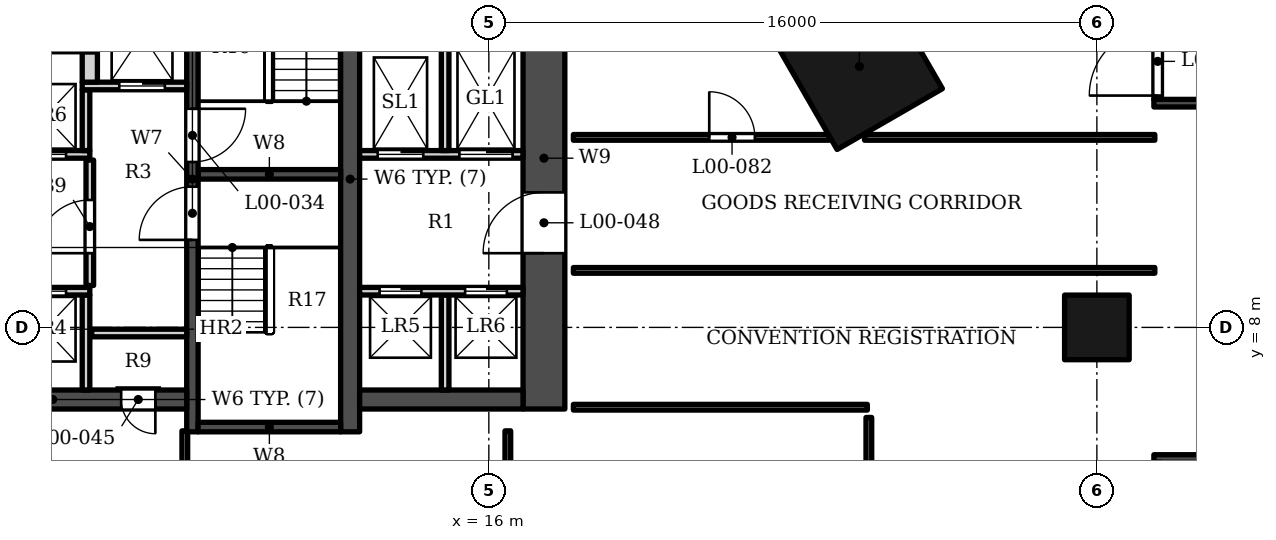
"""IFC4 building model, lengths in metres.
Left out: names, types, materials, properties, quantities, classifications, styles, units other than length and angle.
Written with IfcOpenShell. Run it as: python <this file> out.ifc"""

import sys

from ifc_helpers import new_model, si_unit, direction, frame, frame_2d, origin, origin_2d, place, context, subcontext, project, spatial, rectangle, extrude, element, fill, save


model = new_model("IFC4")
c1 = context("Model", 3, precision=1e-05, world=origin(), true_north=direction((0.0, 1.0)))
c2 = subcontext(c1, "Body", "Model", "MODEL_VIEW")
j1 = project(units=[si_unit("LENGTHUNIT", "METRE"), si_unit("PLANEANGLEUNIT", "RADIAN")], contexts=[c1])
p1 = place(None, origin())
s1 = spatial("IfcSite", under=j1, at=p1, CompositionType="ELEMENT")
p2 = place(p1, origin())
s2 = spatial("IfcBuilding", under=s1, at=p2, CompositionType="ELEMENT")
p3 = place(p2, origin())
s3 = spatial("IfcBuildingStorey", under=s2, at=p3, CompositionType="ELEMENT", Elevation=0.0)
p4 = place(p3, frame((32.0, 8.0, 0.0), z_axis=(0.0, 0.0, 1.0), x_axis=(1.0, 0.0, 0.0)))
e1 = element("IfcColumn", 1, at=p4, inside=s3, PredefinedType="COLUMN", context=c2, shape_type="SweptSolid", body=[
    extrude(rectangle(XDim=1.7, YDim=1.7, at=origin_2d()), origin(), (0.0, 0.0, 1.0), 9.0),
])
p5 = place(p3, frame((25.75, 14.867, 0.0), z_axis=(0.0, 0.0, 1.0), x_axis=(-0.866025386331, -0.50000003023, 0.0)))
e2 = element("IfcColumn", 2, at=p5, inside=s3, PredefinedType="COLUMN", context=c2, shape_type="SweptSolid", body=[
    extrude(rectangle(XDim=3.2, YDim=3.2, at=origin_2d()), origin(), (0.0, 0.0, 1.0), 9.0),
])
p6 = place(p3, frame((12.35, 5.253, 0.0), z_axis=(0.0, 0.0, 1.0), x_axis=(0.0, 1.0, 0.0)))
e3 = element("IfcWall", 3, at=p6, inside=s3, PredefinedType="SHEAR", context=c2, shape_type="SweptSolid", body=[
    extrude(rectangle(XDim=13.3, YDim=0.5, at=frame_2d((6.65, 0.0))), origin(), (0.0, 0.0, 1.0), 9.0),
])
p7 = place(p3, frame((8.2, 5.253, 0.0), z_axis=(0.0, 0.0, 1.0), x_axis=(0.0, 1.0, 0.0)))
e4 = element("IfcWall", 4, at=p7, inside=s3, PredefinedType="SHEAR", context=c2, shape_type="SweptSolid", body=[
    extrude(rectangle(XDim=13.3, YDim=0.3, at=frame_2d((6.65, 0.0))), origin(), (0.0, 0.0, 1.0), 9.0),
])
p8 = place(p7, frame((7.1, 0.0, 0.0)))
e5 = element("IfcOpeningElement", 5, at=p8, cuts=e4, PredefinedType="OPENING", context=c2, shape_type="SweptSolid", body=[
    extrude(rectangle(XDim=1.4, YDim=2.1, at=frame_2d((0.7, 1.05))), frame((0.0, 0.16, 0.0), z_axis=(0.0, -1.0, 0.0), x_axis=(1.0, 0.0, 0.0)), (0.0, 0.0, 1.0), 0.32),
])
p9 = place(p7, frame((5.05, 0.0, 0.0)))
e6 = element("IfcOpeningElement", 6, at=p9, cuts=e4, PredefinedType="OPENING", context=c2, shape_type="SweptSolid", body=[
    extrude(rectangle(XDim=1.4, YDim=2.1, at=frame_2d((0.7, 1.05))), frame((0.0, 0.16, 0.0), z_axis=(0.0, -1.0, 0.0), x_axis=(1.0, 0.0, 0.0)), (0.0, 0.0, 1.0), 0.32),
])
for number, where, z_axis, x_axis in (
    (7, (8.35, 12.028, 0.0), (0.0, 0.0, 1.0), (1.0, 0.0, 0.0)),
    (8, (8.35, 5.378, 0.0), (0.0, 0.0, 1.0), (1.0, 0.0, 0.0)),
):
    element("IfcWall", number, at=place(p3, frame(where, z_axis=z_axis, x_axis=x_axis)), inside=s3, PredefinedType="SHEAR", context=c2, shape_type="SweptSolid", body=[
        extrude(rectangle(XDim=3.75, YDim=0.25, at=frame_2d((1.875, 0.0))), origin(), (0.0, 0.0, 1.0), 9.0),
    ])
p10 = place(p3, frame((1.0, 6.103, 0.0), z_axis=(0.0, 0.0, 1.0), x_axis=(1.0, 0.0, 0.0)))
e9 = element("IfcWall", 9, at=p10, inside=s3, PredefinedType="SHEAR", context=c2, shape_type="SweptSolid", body=[
    extrude(rectangle(XDim=7.05, YDim=0.5, at=frame_2d((3.525, 0.0))), origin(), (0.0, 0.0, 1.0), 9.0),
])
p11 = place(p10, frame((5.325, 0.0, 0.0)))
e10 = element("IfcOpeningElement", 10, at=p11, cuts=e9, PredefinedType="OPENING", context=c2, shape_type="SweptSolid", body=[
    extrude(rectangle(XDim=0.9, YDim=2.1, at=frame_2d((0.45, 1.05))), frame((0.0, 0.26, 0.0), z_axis=(0.0, -1.0, 0.0), x_axis=(1.0, 0.0, 0.0)), (0.0, 0.0, 1.0), 0.52),
])
p12 = place(p3, frame((12.6, 6.103, 0.0), z_axis=(0.0, 0.0, 1.0), x_axis=(1.0, 0.0, 0.0)))
e11 = element("IfcWall", 11, at=p12, inside=s3, PredefinedType="SHEAR", context=c2, shape_type="SweptSolid", body=[
    extrude(rectangle(XDim=4.3, YDim=0.5, at=frame_2d((2.15, 0.0))), origin(), (0.0, 0.0, 1.0), 9.0),
])
p13 = place(p3, frame((17.45, 5.853, 0.0), z_axis=(0.0, 0.0, 1.0), x_axis=(0.0, 1.0, 0.0)))
e12 = element("IfcWall", 12, at=p13, inside=s3, PredefinedType="SHEAR", context=c2, shape_type="SweptSolid", body=[
    extrude(rectangle(XDim=13.2, YDim=1.1, at=frame_2d((6.6, 0.0))), origin(), (0.0, 0.0, 1.0), 9.0),
])
p14 = place(p13, frame((4.1, 0.0, 0.0)))
e13 = element("IfcOpeningElement", 13, at=p14, cuts=e12, PredefinedType="OPENING", context=c2, shape_type="SweptSolid", body=[
    extrude(rectangle(XDim=1.6, YDim=2.1, at=frame_2d((0.8, 1.05))), frame((0.0, 0.56, 0.0), z_axis=(0.0, -1.0, 0.0), x_axis=(1.0, 0.0, 0.0)), (0.0, 0.0, 1.0), 1.12),
])
p15 = place(p13, frame((10.15, 0.0, 0.0)))
e14 = element("IfcOpeningElement", 14, at=p15, cuts=e12, PredefinedType="OPENING", context=c2, shape_type="SweptSolid", body=[
    extrude(rectangle(XDim=0.9, YDim=2.1, at=frame_2d((0.45, 1.05))), frame((0.0, 0.56, 0.0), z_axis=(0.0, -1.0, 0.0), x_axis=(1.0, 0.0, 0.0)), (0.0, 0.0, 1.0), 1.12),
])
for number, where, z_axis, x_axis in (
    (15, (5.4, 6.353, 0.0), (0.0, 0.0, 1.0), (0.0, 1.0, 0.0)),
    (16, (14.85, 6.353, 0.0), (0.0, 0.0, 1.0), (0.0, 1.0, 0.0)),
    (17, (5.55, 7.853, 0.0), (0.0, 0.0, 1.0), (1.0, 0.0, 0.0)),
):
    element("IfcWall", number, at=place(p3, frame(where, z_axis=z_axis, x_axis=x_axis)), inside=s3, PredefinedType="SOLIDWALL", context=c2, shape_type="SweptSolid", body=[
        extrude(rectangle(XDim=2.5, YDim=0.2, at=frame_2d((1.25, 0.0))), origin(), (0.0, 0.0, 1.0), 8.5),
    ])
p16 = place(p3, frame((1.0, 8.953, 0.0), z_axis=(0.0, 0.0, 1.0), x_axis=(1.0, 0.0, 0.0)))
e18 = element("IfcWall", 18, at=p16, inside=s3, PredefinedType="SOLIDWALL", context=c2, shape_type="SweptSolid", body=[
    extrude(rectangle(XDim=4.5, YDim=0.2, at=frame_2d((2.25, 0.0))), origin(), (0.0, 0.0, 1.0), 8.5),
])
p17 = place(p16, frame((0.625, 0.0, 0.0)))
e19 = element("IfcOpeningElement", 19, at=p17, cuts=e18, PredefinedType="OPENING", context=c2, shape_type="SweptSolid", body=[
    extrude(rectangle(XDim=1.1, YDim=2.1, at=frame_2d((0.55, 1.05))), frame((0.0, 0.11, 0.0), z_axis=(0.0, -1.0, 0.0), x_axis=(1.0, 0.0, 0.0)), (0.0, 0.0, 1.0), 0.22),
])
p18 = place(p16, frame((2.775, 0.0, 0.0)))
e20 = element("IfcOpeningElement", 20, at=p18, cuts=e18, PredefinedType="OPENING", context=c2, shape_type="SweptSolid", body=[
    extrude(rectangle(XDim=1.1, YDim=2.1, at=frame_2d((0.55, 1.05))), frame((0.0, 0.11, 0.0), z_axis=(0.0, -1.0, 0.0), x_axis=(1.0, 0.0, 0.0)), (0.0, 0.0, 1.0), 0.22),
])
p19 = place(p3, frame((12.6, 8.953, 0.0), z_axis=(0.0, 0.0, 1.0), x_axis=(1.0, 0.0, 0.0)))
e21 = element("IfcWall", 21, at=p19, inside=s3, PredefinedType="SOLIDWALL", context=c2, shape_type="SweptSolid", body=[
    extrude(rectangle(XDim=4.3, YDim=0.2, at=frame_2d((2.15, 0.0))), origin(), (0.0, 0.0, 1.0), 8.5),
])
p20 = place(p19, frame((0.525, 0.0, 0.0)))
e22 = element("IfcOpeningElement", 22, at=p20, cuts=e21, PredefinedType="OPENING", context=c2, shape_type="SweptSolid", body=[
    extrude(rectangle(XDim=1.1, YDim=2.1, at=frame_2d((0.55, 1.05))), frame((0.0, 0.11, 0.0), z_axis=(0.0, -1.0, 0.0), x_axis=(1.0, 0.0, 0.0)), (0.0, 0.0, 1.0), 0.22),
])
p21 = place(p19, frame((2.775, 0.0, 0.0)))
e23 = element("IfcOpeningElement", 23, at=p21, cuts=e21, PredefinedType="OPENING", context=c2, shape_type="SweptSolid", body=[
    extrude(rectangle(XDim=1.1, YDim=2.1, at=frame_2d((0.55, 1.05))), frame((0.0, 0.11, 0.0), z_axis=(0.0, -1.0, 0.0), x_axis=(1.0, 0.0, 0.0)), (0.0, 0.0, 1.0), 0.22),
])
p22 = place(p3, frame((5.5, 9.103, 0.0), z_axis=(0.0, 0.0, 1.0), x_axis=(0.0, 1.0, 0.0)))
e24 = element("IfcWall", 24, at=p22, inside=s3, PredefinedType="SOLIDWALL", context=c2, shape_type="SweptSolid", body=[
    extrude(rectangle(XDim=3.3, YDim=0.2, at=frame_2d((1.65, 0.0))), origin(), (0.0, 0.0, 1.0), 8.5),
])
p23 = place(p22, frame((0.85, 0.0, 0.0)))
e25 = element("IfcOpeningElement", 25, at=p23, cuts=e24, PredefinedType="OPENING", context=c2, shape_type="SweptSolid", body=[
    extrude(rectangle(XDim=1.4, YDim=2.1, at=frame_2d((0.7, 1.05))), frame((0.0, 0.11, 0.0), z_axis=(0.0, -1.0, 0.0), x_axis=(1.0, 0.0, 0.0)), (0.0, 0.0, 1.0), 0.22),
])
p24 = place(p3, frame((-1.5, 12.552, 0.0), z_axis=(0.0, 0.0, 1.0), x_axis=(1.0, 0.0, 0.0)))
e26 = element("IfcWall", 26, at=p24, inside=s3, PredefinedType="SOLIDWALL", context=c2, shape_type="SweptSolid", body=[
    extrude(rectangle(XDim=7.0, YDim=0.2, at=frame_2d((3.5, 0.0))), origin(), (0.0, 0.0, 1.0), 8.5),
])
p25 = place(p24, frame((0.6, 0.0, 0.0)))
e27 = element("IfcOpeningElement", 27, at=p25, cuts=e26, PredefinedType="OPENING", context=c2, shape_type="SweptSolid", body=[
    extrude(rectangle(XDim=1.4, YDim=2.4, at=frame_2d((0.7, 1.2))), frame((0.0, 0.11, 0.0), z_axis=(0.0, -1.0, 0.0), x_axis=(1.0, 0.0, 0.0)), (0.0, 0.0, 1.0), 0.22),
])
p26 = place(p24, frame((3.075, 0.0, 0.0)))
e28 = element("IfcOpeningElement", 28, at=p26, cuts=e26, PredefinedType="OPENING", context=c2, shape_type="SweptSolid", body=[
    extrude(rectangle(XDim=1.1, YDim=2.1, at=frame_2d((0.55, 1.05))), frame((0.0, 0.11, 0.0), z_axis=(0.0, -1.0, 0.0), x_axis=(1.0, 0.0, 0.0)), (0.0, 0.0, 1.0), 0.22),
])
p27 = place(p24, frame((5.275, 0.0, 0.0)))
e29 = element("IfcOpeningElement", 29, at=p27, cuts=e26, PredefinedType="OPENING", context=c2, shape_type="SweptSolid", body=[
    extrude(rectangle(XDim=1.1, YDim=2.1, at=frame_2d((0.55, 1.05))), frame((0.0, 0.11, 0.0), z_axis=(0.0, -1.0, 0.0), x_axis=(1.0, 0.0, 0.0)), (0.0, 0.0, 1.0), 0.22),
])
p28 = place(p3, frame((12.6, 12.552, 0.0), z_axis=(0.0, 0.0, 1.0), x_axis=(1.0, 0.0, 0.0)))
e30 = element("IfcWall", 30, at=p28, inside=s3, PredefinedType="SOLIDWALL", context=c2, shape_type="SweptSolid", body=[
    extrude(rectangle(XDim=4.3, YDim=0.2, at=frame_2d((2.15, 0.0))), origin(), (0.0, 0.0, 1.0), 8.5),
])
p29 = place(p28, frame((0.475, 0.0, 0.0)))
e31 = element("IfcOpeningElement", 31, at=p29, cuts=e30, PredefinedType="OPENING", context=c2, shape_type="SweptSolid", body=[
    extrude(rectangle(XDim=1.2, YDim=2.1, at=frame_2d((0.6, 1.05))), frame((0.0, 0.11, 0.0), z_axis=(0.0, -1.0, 0.0), x_axis=(1.0, 0.0, 0.0)), (0.0, 0.0, 1.0), 0.22),
])
p30 = place(p28, frame((2.625, 0.0, 0.0)))
e32 = element("IfcOpeningElement", 32, at=p30, cuts=e30, PredefinedType="OPENING", context=c2, shape_type="SweptSolid", body=[
    extrude(rectangle(XDim=1.4, YDim=2.1, at=frame_2d((0.7, 1.05))), frame((0.0, 0.11, 0.0), z_axis=(0.0, -1.0, 0.0), x_axis=(1.0, 0.0, 0.0)), (0.0, 0.0, 1.0), 0.22),
])
p31 = place(p3, frame((5.4, 12.653, 0.0), z_axis=(0.0, 0.0, 1.0), x_axis=(0.0, 1.0, 0.0)))
e33 = element("IfcWall", 33, at=p31, inside=s3, PredefinedType="SOLIDWALL", context=c2, shape_type="SweptSolid", body=[
    extrude(rectangle(XDim=1.6, YDim=0.2, at=frame_2d((0.8, 0.0))), origin(), (0.0, 0.0, 1.0), 8.5),
])
p32 = place(p3, frame((14.85, 12.653, 0.0), z_axis=(0.0, 0.0, 1.0), x_axis=(0.0, 1.0, 0.0)))
e34 = element("IfcWall", 34, at=p32, inside=s3, PredefinedType="SOLIDWALL", context=c2, shape_type="SweptSolid", body=[
    extrude(rectangle(XDim=3.0, YDim=0.2, at=frame_2d((1.5, 0.0))), origin(), (0.0, 0.0, 1.0), 8.5),
])
p33 = place(p3, frame((5.3, 14.353, 0.0), z_axis=(0.0, 0.0, 1.0), x_axis=(1.0, 0.0, 0.0)))
e35 = element("IfcWall", 35, at=p33, inside=s3, PredefinedType="SOLIDWALL", context=c2, shape_type="SweptSolid", body=[
    extrude(rectangle(XDim=2.75, YDim=0.2, at=frame_2d((1.375, 0.0))), origin(), (0.0, 0.0, 1.0), 8.5),
])
p34 = place(p33, frame((0.975, 0.0, 0.0)))
e36 = element("IfcOpeningElement", 36, at=p34, cuts=e35, PredefinedType="OPENING", context=c2, shape_type="SweptSolid", body=[
    extrude(rectangle(XDim=1.2, YDim=2.1, at=frame_2d((0.6, 1.05))), frame((0.0, 0.11, 0.0), z_axis=(0.0, -1.0, 0.0), x_axis=(1.0, 0.0, 0.0)), (0.0, 0.0, 1.0), 0.22),
])
p35 = place(p3, frame((5.5, 14.453, 0.0), z_axis=(0.0, 0.0, 1.0), x_axis=(0.0, 1.0, 0.0)))
e37 = element("IfcWall", 37, at=p35, inside=s3, PredefinedType="SOLIDWALL", context=c2, shape_type="SweptSolid", body=[
    extrude(rectangle(XDim=0.8, YDim=0.4, at=frame_2d((0.4, 0.0))), origin(), (0.0, 0.0, 1.0), 8.5),
])
p36 = place(p3, frame((-1.5, 15.353, 0.0), z_axis=(0.0, 0.0, 1.0), x_axis=(1.0, 0.0, 0.0)))
e38 = element("IfcWall", 38, at=p36, inside=s3, PredefinedType="SOLIDWALL", context=c2, shape_type="SweptSolid", body=[
    extrude(rectangle(XDim=7.2, YDim=0.2, at=frame_2d((3.6, 0.0))), origin(), (0.0, 0.0, 1.0), 8.5),
])
for number, where, z_axis, x_axis in (
    (39, (33.5, 4.55, 0.0), (0.0, 0.0, 1.0), (1.0, 0.0, 0.0)),
    (40, (33.5, 13.9, 0.0), (0.0, 0.0, 1.0), (1.0, 0.0, 0.0)),
):
    element("IfcWall", number, at=place(p3, frame(where, z_axis=z_axis, x_axis=x_axis)), inside=s3, PredefinedType="SOLIDWALL", context=c2, shape_type="SweptSolid", body=[
        extrude(rectangle(XDim=4.87, YDim=0.2, at=frame_2d((2.435, 0.0))), origin(), (0.0, 0.0, 1.0), 8.5),
    ])
p37 = place(p3, frame((33.6, 14.0, 0.0), z_axis=(0.0, 0.0, 1.0), x_axis=(0.0, 1.0, 0.0)))
e41 = element("IfcWall", 41, at=p37, inside=s3, PredefinedType="SOLIDWALL", context=c2, shape_type="SweptSolid", body=[
    extrude(rectangle(XDim=6.65, YDim=0.2, at=frame_2d((3.325, 0.0))), origin(), (0.0, 0.0, 1.0), 8.5),
])
p38 = place(p37, frame((0.1, 0.0, 0.0)))
e42 = element("IfcOpeningElement", 42, at=p38, cuts=e41, PredefinedType="OPENING", context=c2, shape_type="SweptSolid", body=[
    extrude(rectangle(XDim=1.8, YDim=2.4, at=frame_2d((0.9, 1.2))), frame((0.0, 0.11, 0.0), z_axis=(0.0, -1.0, 0.0), x_axis=(1.0, 0.0, 0.0)), (0.0, 0.0, 1.0), 0.22),
])
for number, where, z_axis, x_axis in (
    (43, (8.0, 0.075, 0.0), (0.0, 0.0, 1.0), (0.0, 1.0, 0.0)),
    (44, (16.5, 0.075, 0.0), (0.0, 0.0, 1.0), (0.0, 1.0, 0.0)),
):
    element("IfcWall", number, at=place(p3, frame(where, z_axis=z_axis, x_axis=x_axis)), inside=s3, PredefinedType="PARTITIONING", context=c2, shape_type="SweptSolid", body=[
        extrude(rectangle(XDim=5.203, YDim=0.15, at=frame_2d((2.602, 0.0))), origin(), (0.0, 0.0, 1.0), 8.5),
    ])
p39 = place(p3, frame((26.0, 0.075, 0.0), z_axis=(0.0, 0.0, 1.0), x_axis=(0.0, 1.0, 0.0)))
e45 = element("IfcWall", 45, at=p39, inside=s3, PredefinedType="PARTITIONING", context=c2, shape_type="SweptSolid", body=[
    extrude(rectangle(XDim=5.555, YDim=0.15, at=frame_2d((2.777, 0.0))), origin(), (0.0, 0.0, 1.0), 8.5),
])
p40 = place(p3, frame((18.225, 5.9, 0.0), z_axis=(0.0, 0.0, 1.0), x_axis=(1.0, 0.0, 0.0)))
e46 = element("IfcWall", 46, at=p40, inside=s3, PredefinedType="PARTITIONING", context=c2, shape_type="SweptSolid", body=[
    extrude(rectangle(XDim=7.735, YDim=0.15, at=frame_2d((3.867, 0.0))), origin(), (0.0, 0.0, 1.0), 7.6),
])
p41 = place(p3, frame((18.225, 9.5, 0.0), z_axis=(0.0, 0.0, 1.0), x_axis=(1.0, 0.0, 0.0)))
e47 = element("IfcWall", 47, at=p41, inside=s3, PredefinedType="PARTITIONING", context=c2, shape_type="SweptSolid", body=[
    extrude(rectangle(XDim=15.3, YDim=0.15, at=frame_2d((7.65, 0.0))), origin(), (0.0, 0.0, 1.0), 7.3),
])
p42 = place(p3, frame((18.225, 13.0, 0.0), z_axis=(0.0, 0.0, 1.0), x_axis=(1.0, 0.0, 0.0)))
e48 = element("IfcWall", 48, at=p42, inside=s3, PredefinedType="PARTITIONING", context=c2, shape_type="SweptSolid", body=[
    extrude(rectangle(XDim=6.732, YDim=0.15, at=frame_2d((3.366, 0.0))), origin(), (0.0, 0.0, 1.0), 7.6),
])
p43 = place(p42, frame((3.575, 0.0, 0.0)))
e49 = element("IfcOpeningElement", 49, at=p43, cuts=e48, PredefinedType="OPENING", context=c2, shape_type="SweptSolid", body=[
    extrude(rectangle(XDim=1.2, YDim=2.1, at=frame_2d((0.6, 1.05))), frame((0.0, 0.085, 0.0), z_axis=(0.0, -1.0, 0.0), x_axis=(1.0, 0.0, 0.0)), (0.0, 0.0, 1.0), 0.17),
])
p44 = place(p3, frame((25.886, 13.0, 0.0), z_axis=(0.0, 0.0, 1.0), x_axis=(1.0, 0.0, 0.0)))
e50 = element("IfcWall", 50, at=p44, inside=s3, PredefinedType="PARTITIONING", context=c2, shape_type="SweptSolid", body=[
    extrude(rectangle(XDim=7.639, YDim=0.15, at=frame_2d((3.819, 0.0))), origin(), (0.0, 0.0, 1.0), 7.3),
])
p45 = place(p18, origin())
e51 = element("IfcDoor", 51, at=p45, inside=s3, OperationType="DOUBLE_DOOR_SLIDING", PredefinedType="DOOR", context=c2, shape_type="SweptSolid", body=[
    extrude(rectangle(XDim=1.1, YDim=2.1, at=frame_2d((0.55, 1.05))), frame((0.0, 0.025, 0.0), z_axis=(0.0, -1.0, 0.0), x_axis=(1.0, 0.0, 0.0)), (0.0, 0.0, 1.0), 0.05),
])
fill(e20, e51)
p46 = place(p27, origin())
e52 = element("IfcDoor", 52, at=p46, inside=s3, OperationType="DOUBLE_DOOR_SLIDING", PredefinedType="DOOR", context=c2, shape_type="SweptSolid", body=[
    extrude(rectangle(XDim=1.1, YDim=2.1, at=frame_2d((0.55, 1.05))), frame((0.0, 0.025, 0.0), z_axis=(0.0, -1.0, 0.0), x_axis=(1.0, 0.0, 0.0)), (0.0, 0.0, 1.0), 0.05),
])
fill(e29, e52)
p47 = place(p34, origin())
e53 = element("IfcDoor", 53, at=p47, inside=s3, OperationType="DOUBLE_DOOR_SLIDING", PredefinedType="DOOR", context=c2, shape_type="SweptSolid", body=[
    extrude(rectangle(XDim=1.2, YDim=2.1, at=frame_2d((0.6, 1.05))), frame((0.0, 0.025, 0.0), z_axis=(0.0, -1.0, 0.0), x_axis=(1.0, 0.0, 0.0)), (0.0, 0.0, 1.0), 0.05),
])
fill(e36, e53)
p48 = place(p20, origin())
e54 = element("IfcDoor", 54, at=p48, inside=s3, OperationType="DOUBLE_DOOR_SLIDING", PredefinedType="DOOR", context=c2, shape_type="SweptSolid", body=[
    extrude(rectangle(XDim=1.1, YDim=2.1, at=frame_2d((0.55, 1.05))), frame((0.0, 0.025, 0.0), z_axis=(0.0, -1.0, 0.0), x_axis=(1.0, 0.0, 0.0)), (0.0, 0.0, 1.0), 0.05),
])
fill(e22, e54)
p49 = place(p21, origin())
e55 = element("IfcDoor", 55, at=p49, inside=s3, OperationType="DOUBLE_DOOR_SLIDING", PredefinedType="DOOR", context=c2, shape_type="SweptSolid", body=[
    extrude(rectangle(XDim=1.1, YDim=2.1, at=frame_2d((0.55, 1.05))), frame((0.0, 0.025, 0.0), z_axis=(0.0, -1.0, 0.0), x_axis=(1.0, 0.0, 0.0)), (0.0, 0.0, 1.0), 0.05),
])
fill(e23, e55)
p50 = place(p29, origin())
e56 = element("IfcDoor", 56, at=p50, inside=s3, OperationType="DOUBLE_DOOR_SLIDING", PredefinedType="DOOR", context=c2, shape_type="SweptSolid", body=[
    extrude(rectangle(XDim=1.2, YDim=2.1, at=frame_2d((0.6, 1.05))), frame((0.0, 0.025, 0.0), z_axis=(0.0, -1.0, 0.0), x_axis=(1.0, 0.0, 0.0)), (0.0, 0.0, 1.0), 0.05),
])
fill(e31, e56)
p51 = place(p30, origin())
e57 = element("IfcDoor", 57, at=p51, inside=s3, OperationType="DOUBLE_DOOR_SLIDING", PredefinedType="DOOR", context=c2, shape_type="SweptSolid", body=[
    extrude(rectangle(XDim=1.4, YDim=2.1, at=frame_2d((0.7, 1.05))), frame((0.0, 0.025, 0.0), z_axis=(0.0, -1.0, 0.0), x_axis=(1.0, 0.0, 0.0)), (0.0, 0.0, 1.0), 0.05),
])
fill(e32, e57)
p52 = place(p8, origin())
e58 = element("IfcDoor", 58, at=p52, inside=s3, OperationType="SINGLE_SWING_RIGHT", PredefinedType="DOOR", context=c2, shape_type="SweptSolid", body=[
    extrude(rectangle(XDim=1.4, YDim=2.1, at=frame_2d((0.7, 1.05))), frame((0.0, 0.025, 0.0), z_axis=(0.0, -1.0, 0.0), x_axis=(1.0, 0.0, 0.0)), (0.0, 0.0, 1.0), 0.05),
])
fill(e5, e58)
p53 = place(p9, origin())
e59 = element("IfcDoor", 59, at=p53, inside=s3, OperationType="SINGLE_SWING_LEFT", PredefinedType="DOOR", context=c2, shape_type="SweptSolid", body=[
    extrude(rectangle(XDim=1.4, YDim=2.1, at=frame_2d((0.7, 1.05))), frame((0.0, 0.025, 0.0), z_axis=(0.0, -1.0, 0.0), x_axis=(1.0, 0.0, 0.0)), (0.0, 0.0, 1.0), 0.05),
])
fill(e6, e59)
p54 = place(p23, origin())
e60 = element("IfcDoor", 60, at=p54, inside=s3, OperationType="SINGLE_SWING_LEFT", PredefinedType="DOOR", context=c2, shape_type="SweptSolid", body=[
    extrude(rectangle(XDim=1.4, YDim=2.1, at=frame_2d((0.7, 1.05))), frame((0.0, 0.025, 0.0), z_axis=(0.0, -1.0, 0.0), x_axis=(1.0, 0.0, 0.0)), (0.0, 0.0, 1.0), 0.05),
])
fill(e25, e60)
p55 = place(p11, origin())
e61 = element("IfcDoor", 61, at=p55, inside=s3, OperationType="SINGLE_SWING_RIGHT", PredefinedType="DOOR", context=c2, shape_type="SweptSolid", body=[
    extrude(rectangle(XDim=0.9, YDim=2.1, at=frame_2d((0.45, 1.05))), frame((0.0, 0.025, 0.0), z_axis=(0.0, -1.0, 0.0), x_axis=(1.0, 0.0, 0.0)), (0.0, 0.0, 1.0), 0.05),
])
fill(e10, e61)
p56 = place(p14, origin())
e62 = element("IfcDoor", 62, at=p56, inside=s3, OperationType="DOUBLE_DOOR_SINGLE_SWING", PredefinedType="DOOR", context=c2, shape_type="SweptSolid", body=[
    extrude(rectangle(XDim=1.6, YDim=2.1, at=frame_2d((0.8, 1.05))), frame((0.0, 0.275, 0.0), z_axis=(0.0, -1.0, 0.0), x_axis=(1.0, 0.0, 0.0)), (0.0, 0.0, 1.0), 0.05),
])
fill(e13, e62)
p57 = place(p38, origin())
e63 = element("IfcDoor", 63, at=p57, inside=s3, OperationType="DOUBLE_DOOR_SINGLE_SWING", PredefinedType="DOOR", context=c2, shape_type="SweptSolid", body=[
    extrude(rectangle(XDim=1.8, YDim=2.4, at=frame_2d((0.9, 1.2))), frame((0.0, 0.025, 0.0), z_axis=(0.0, -1.0, 0.0), x_axis=(1.0, 0.0, 0.0)), (0.0, 0.0, 1.0), 0.05),
])
fill(e42, e63)
p58 = place(p43, origin())
e64 = element("IfcDoor", 64, at=p58, inside=s3, OperationType="SINGLE_SWING_LEFT", PredefinedType="DOOR", context=c2, shape_type="SweptSolid", body=[
    extrude(rectangle(XDim=1.2, YDim=2.1, at=frame_2d((0.6, 1.05))), frame((0.0, 0.025, 0.0), z_axis=(0.0, -1.0, 0.0), x_axis=(1.0, 0.0, 0.0)), (0.0, 0.0, 1.0), 0.05),
])
fill(e49, e64)
save(model, sys.argv[1])
